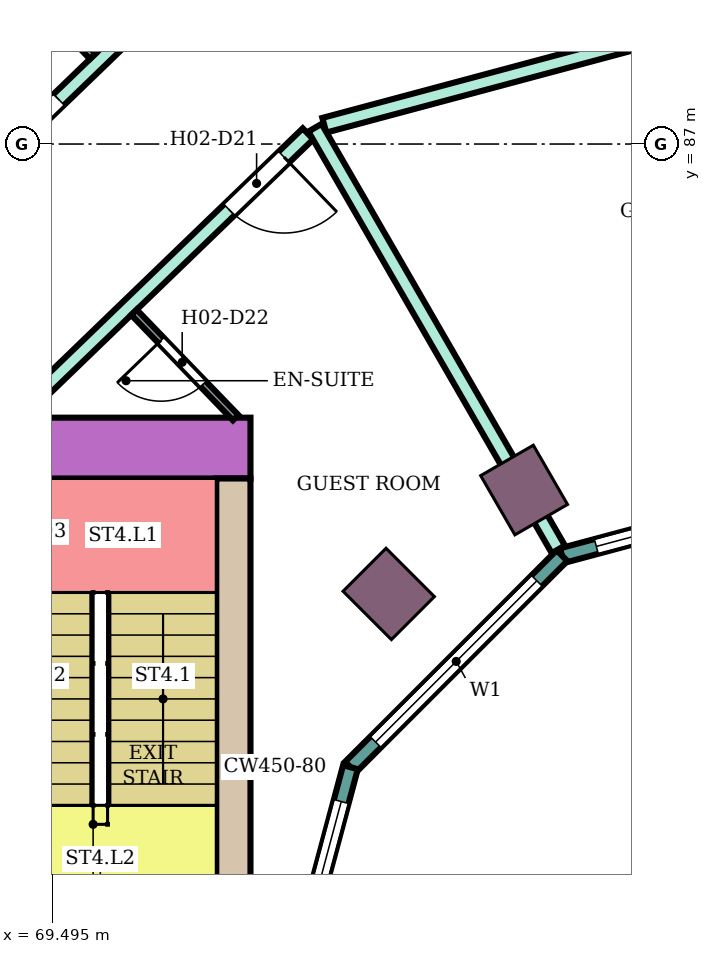
"""IFC4 building model, lengths in metres.
Left out: names, types, materials, properties, quantities, classifications, styles, units other than length and angle.
Written with IfcOpenShell. Run it as: python <this file> out.ifc"""

import sys

from ifc_helpers import new_model, si_unit, direction, frame, frame_2d, origin, origin_2d, place, context, subcontext, project, spatial, rectangle, extrude, element, fill, save


model = new_model("IFC4")
c1 = context("Model", 3, precision=1e-05, world=origin(), true_north=direction((0.0, 1.0)))
c2 = subcontext(c1, "Body", "Model", "MODEL_VIEW")
j1 = project(units=[si_unit("LENGTHUNIT", "METRE"), si_unit("PLANEANGLEUNIT", "RADIAN")], contexts=[c1])
p1 = place(None, origin())
s1 = spatial("IfcSite", under=j1, at=p1, CompositionType="ELEMENT")
p2 = place(p1, origin())
s2 = spatial("IfcBuilding", under=s1, at=p2, CompositionType="ELEMENT")
p3 = place(p2, frame((0.0, 0.0, 47.8)))
s3 = spatial("IfcBuildingStorey", under=s2, at=p3, CompositionType="ELEMENT", Elevation=47.8)
for number, where, z_axis, x_axis in (
    (1, (75.7, 82.448, 0.0), (0.0, 0.0, 1.0), (-0.5, 0.866, 0.0)),
    (2, (73.919, 81.081, 0.0), (0.0, 0.0, 1.0), (-0.707, 0.707, 0.0)),
):
    element("IfcColumn", number, at=place(p3, frame(where, z_axis=z_axis, x_axis=x_axis)), inside=s3, PredefinedType="COLUMN", context=c2, shape_type="SweptSolid", body=[
        extrude(rectangle(XDim=0.9, YDim=0.8, at=origin_2d()), origin(), (0.0, 0.0, 1.0), 3.8),
    ])
p4 = place(p3, frame((72.1, 83.0, 0.0), z_axis=(0.0, 0.0, 1.0), x_axis=(-1.0, 0.0, 0.0)))
e3 = element("IfcWall", 3, at=p4, inside=s3, PredefinedType="SHEAR", context=c2, shape_type="SweptSolid", body=[
    extrude(rectangle(XDim=14.7, YDim=0.8, at=frame_2d((7.35, 0.0))), origin(), (0.0, 0.0, 1.0), 3.48),
])
p5 = place(p4, frame((4.2, 0.0, 0.0)))
e4 = element("IfcOpeningElement", 4, at=p5, cuts=e3, PredefinedType="OPENING", context=c2, shape_type="SweptSolid", body=[
    extrude(rectangle(XDim=2.4, YDim=2.4, at=frame_2d((1.2, 1.2))), frame((0.0, 0.41, 0.0), z_axis=(0.0, -1.0, 0.0), x_axis=(1.0, 0.0, 0.0)), (0.0, 0.0, 1.0), 0.82),
])
p6 = place(p3, frame((71.875, 82.6, 0.0), z_axis=(0.0, 0.0, 1.0), x_axis=(0.0, -1.0, 0.0)))
e5 = element("IfcWall", 5, at=p6, inside=s3, PredefinedType="SHEAR", context=c2, shape_type="SweptSolid", body=[
    extrude(rectangle(XDim=7.6, YDim=0.45, at=frame_2d((3.8, 0.0))), origin(), (0.0, 0.0, 1.0), 3.48),
])
p7 = place(p3, frame((80.0, 82.604, 0.0), z_axis=(0.0, 0.0, 1.0), x_axis=(-0.965933654434, -0.258789828301, 0.0)))
e6 = element("IfcWall", 6, at=p7, inside=s3, PredefinedType="NOTDEFINED", context=c2, shape_type="SweptSolid", body=[
    extrude(rectangle(XDim=3.936, YDim=0.2, at=frame_2d((1.968, 0.0))), origin(), (0.0, 0.0, 1.0), 3.8),
])
p8 = place(p7, frame((0.468, 0.0, 0.9)))
e7 = element("IfcOpeningElement", 7, at=p8, cuts=e6, PredefinedType="OPENING", context=c2, shape_type="SweptSolid", body=[
    extrude(rectangle(XDim=3.0, YDim=2.3, at=frame_2d((1.5, 1.15))), frame((0.0, 0.11, 0.0), z_axis=(0.0, -1.0, 0.0), x_axis=(1.0, 0.0, 0.0)), (0.0, 0.0, 1.0), 0.22),
])
p9 = place(p3, frame((76.198, 81.585, 0.0), z_axis=(0.0, 0.0, 1.0), x_axis=(-0.707106781187, -0.707106781187, 0.0)))
e8 = element("IfcWall", 8, at=p9, inside=s3, PredefinedType="NOTDEFINED", context=c2, shape_type="SweptSolid", body=[
    extrude(rectangle(XDim=3.936, YDim=0.2, at=frame_2d((1.968, 0.0))), origin(), (0.0, 0.0, 1.0), 3.8),
])
p10 = place(p9, frame((0.468, 0.0, 0.9)))
e9 = element("IfcOpeningElement", 9, at=p10, cuts=e8, PredefinedType="OPENING", context=c2, shape_type="SweptSolid", body=[
    extrude(rectangle(XDim=3.0, YDim=2.3, at=frame_2d((1.5, 1.15))), frame((0.0, 0.11, 0.0), z_axis=(0.0, -1.0, 0.0), x_axis=(1.0, 0.0, 0.0)), (0.0, 0.0, 1.0), 0.22),
])
p11 = place(p3, frame((73.415, 78.802, 0.0), z_axis=(0.0, 0.0, 1.0), x_axis=(-0.258789828301, -0.965933654434, 0.0)))
e10 = element("IfcWall", 10, at=p11, inside=s3, PredefinedType="NOTDEFINED", context=c2, shape_type="SweptSolid", body=[
    extrude(rectangle(XDim=3.936, YDim=0.2, at=frame_2d((1.968, 0.0))), origin(), (0.0, 0.0, 1.0), 3.8),
])
p12 = place(p11, frame((0.468, 0.0, 0.9)))
e11 = element("IfcOpeningElement", 11, at=p12, cuts=e10, PredefinedType="OPENING", context=c2, shape_type="SweptSolid", body=[
    extrude(rectangle(XDim=3.0, YDim=2.3, at=frame_2d((1.5, 1.15))), frame((0.0, 0.11, 0.0), z_axis=(0.0, -1.0, 0.0), x_axis=(1.0, 0.0, 0.0)), (0.0, 0.0, 1.0), 0.22),
])
p13 = place(p3, frame((66.796, 84.9, 0.0), z_axis=(0.0, 0.0, 1.0), x_axis=(0.719690131178, 0.694295409092, 0.0)))
e12 = element("IfcWall", 12, at=p13, inside=s3, PredefinedType="PARTITIONING", context=c2, shape_type="SweptSolid", body=[
    extrude(rectangle(XDim=6.585, YDim=0.2, at=frame_2d((3.293, 0.0))), origin(), (0.0, 0.0, 1.0), 3.35),
])
p14 = place(p13, frame((2.867, 0.0, 0.0)))
e13 = element("IfcOpeningElement", 13, at=p14, cuts=e12, PredefinedType="OPENING", context=c2, shape_type="SweptSolid", body=[
    extrude(rectangle(XDim=1.0, YDim=2.1, at=frame_2d((0.5, 1.05))), frame((0.0, 0.11, 0.0), z_axis=(0.0, -1.0, 0.0), x_axis=(1.0, 0.0, 0.0)), (0.0, 0.0, 1.0), 0.22),
])
p15 = place(p3, frame((68.987, 83.4, 0.0), z_axis=(0.0, 0.0, 1.0), x_axis=(0.719591503389, 0.694397629784, 0.0)))
e14 = element("IfcWall", 14, at=p15, inside=s3, PredefinedType="PARTITIONING", context=c2, shape_type="SweptSolid", body=[
    extrude(rectangle(XDim=5.378, YDim=0.2, at=frame_2d((2.689, 0.0))), origin(), (0.0, 0.0, 1.0), 3.35),
])
p16 = place(p15, frame((3.938, 0.0, 0.0)))
e15 = element("IfcOpeningElement", 15, at=p16, cuts=e14, PredefinedType="OPENING", context=c2, shape_type="SweptSolid", body=[
    extrude(rectangle(XDim=1.0, YDim=2.1, at=frame_2d((0.5, 1.05))), frame((0.0, 0.11, 0.0), z_axis=(0.0, -1.0, 0.0), x_axis=(1.0, 0.0, 0.0)), (0.0, 0.0, 1.0), 0.22),
])
p17 = place(p3, frame((73.071, 87.247, 0.0), z_axis=(0.0, 0.0, 1.0), x_axis=(0.965920206274, 0.258840018373, 0.0)))
e16 = element("IfcWall", 16, at=p17, inside=s3, PredefinedType="PARTITIONING", context=c2, shape_type="SweptSolid", body=[
    extrude(rectangle(XDim=7.123, YDim=0.2, at=frame_2d((3.562, 0.0))), origin(), (0.0, 0.0, 1.0), 3.35),
])
p18 = place(p3, frame((72.949, 87.215, 0.0), z_axis=(0.0, 0.0, 1.0), x_axis=(0.499890755261, -0.866088467077, 0.0)))
e17 = element("IfcWall", 17, at=p18, inside=s3, PredefinedType="PARTITIONING", context=c2, shape_type="SweptSolid", body=[
    extrude(rectangle(XDim=6.404, YDim=0.2, at=frame_2d((3.202, 0.0))), origin(), (0.0, 0.0, 1.0), 3.35),
])
p19 = place(p3, frame((68.185, 90.06, 0.0), z_axis=(0.0, 0.0, 1.0), x_axis=(0.69446127412, -0.719530081892, 0.0)))
e18 = element("IfcWall", 18, at=p19, inside=s3, PredefinedType="PARTITIONING", context=c2, shape_type="SweptSolid", body=[
    extrude(rectangle(XDim=2.649, YDim=0.1, at=frame_2d((1.324, 0.0))), origin(), (0.0, 0.0, 1.0), 3.35),
])
p20 = place(p19, frame((0.95, 0.0, 0.0)))
e19 = element("IfcOpeningElement", 19, at=p20, cuts=e18, PredefinedType="OPENING", context=c2, shape_type="SweptSolid", body=[
    extrude(rectangle(XDim=0.8, YDim=2.1, at=frame_2d((0.4, 1.05))), frame((0.0, 0.06, 0.0), z_axis=(0.0, -1.0, 0.0), x_axis=(1.0, 0.0, 0.0)), (0.0, 0.0, 1.0), 0.12),
])
p21 = place(p3, frame((70.567, 84.786, 0.0), z_axis=(0.0, 0.0, 1.0), x_axis=(0.694447472534, -0.719543402368, 0.0)))
e20 = element("IfcWall", 20, at=p21, inside=s3, PredefinedType="PARTITIONING", context=c2, shape_type="SweptSolid", body=[
    extrude(rectangle(XDim=1.926, YDim=0.1, at=frame_2d((0.963, 0.0))), origin(), (0.0, 0.0, 1.0), 3.35),
])
p22 = place(p21, frame((0.513, 0.0, 0.0)))
e21 = element("IfcOpeningElement", 21, at=p22, cuts=e20, PredefinedType="OPENING", context=c2, shape_type="SweptSolid", body=[
    extrude(rectangle(XDim=0.8, YDim=2.1, at=frame_2d((0.4, 1.05))), frame((0.0, 0.06, 0.0), z_axis=(0.0, -1.0, 0.0), x_axis=(1.0, 0.0, 0.0)), (0.0, 0.0, 1.0), 0.12),
])
p23 = place(p8, origin())
e22 = element("IfcWindow", 22, at=p23, inside=s3, PartitioningType="SINGLE_PANEL", PredefinedType="WINDOW", context=c2, shape_type="SweptSolid", body=[
    extrude(rectangle(XDim=3.0, YDim=2.3, at=frame_2d((1.5, 1.15))), frame((0.0, 0.03, 0.0), z_axis=(0.0, -1.0, 0.0), x_axis=(1.0, 0.0, 0.0)), (0.0, 0.0, 1.0), 0.06),
])
fill(e7, e22)
p24 = place(p10, origin())
e23 = element("IfcWindow", 23, at=p24, inside=s3, PartitioningType="SINGLE_PANEL", PredefinedType="WINDOW", context=c2, shape_type="SweptSolid", body=[
    extrude(rectangle(XDim=3.0, YDim=2.3, at=frame_2d((1.5, 1.15))), frame((0.0, 0.03, 0.0), z_axis=(0.0, -1.0, 0.0), x_axis=(1.0, 0.0, 0.0)), (0.0, 0.0, 1.0), 0.06),
])
fill(e9, e23)
p25 = place(p12, origin())
e24 = element("IfcWindow", 24, at=p25, inside=s3, PartitioningType="SINGLE_PANEL", PredefinedType="WINDOW", context=c2, shape_type="SweptSolid", body=[
    extrude(rectangle(XDim=3.0, YDim=2.3, at=frame_2d((1.5, 1.15))), frame((0.0, 0.03, 0.0), z_axis=(0.0, -1.0, 0.0), x_axis=(1.0, 0.0, 0.0)), (0.0, 0.0, 1.0), 0.06),
])
fill(e11, e24)
p26 = place(p14, origin())
e25 = element("IfcDoor", 25, at=p26, inside=s3, OperationType="SINGLE_SWING_LEFT", PredefinedType="DOOR", context=c2, shape_type="SweptSolid", body=[
    extrude(rectangle(XDim=1.0, YDim=2.1, at=frame_2d((0.5, 1.05))), frame((0.0, 0.025, 0.0), z_axis=(0.0, -1.0, 0.0), x_axis=(1.0, 0.0, 0.0)), (0.0, 0.0, 1.0), 0.05),
])
fill(e13, e25)
p27 = place(p16, frame((1.0, 0.0, 0.0), z_axis=(0.0, 0.0, 1.0), x_axis=(-1.0, 0.0, 0.0)))
e26 = element("IfcDoor", 26, at=p27, inside=s3, OperationType="SINGLE_SWING_LEFT", PredefinedType="DOOR", context=c2, shape_type="SweptSolid", body=[
    extrude(rectangle(XDim=1.0, YDim=2.1, at=frame_2d((0.5, 1.05))), frame((0.0, 0.025, 0.0), z_axis=(0.0, -1.0, 0.0), x_axis=(1.0, 0.0, 0.0)), (0.0, 0.0, 1.0), 0.05),
])
fill(e15, e26)
p28 = place(p22, frame((0.8, 0.0, 0.0), z_axis=(0.0, 0.0, 1.0), x_axis=(-1.0, 0.0, 0.0)))
e27 = element("IfcDoor", 27, at=p28, inside=s3, OperationType="SINGLE_SWING_RIGHT", PredefinedType="DOOR", context=c2, shape_type="SweptSolid", body=[
    extrude(rectangle(XDim=0.8, YDim=2.1, at=frame_2d((0.4, 1.05))), frame((0.0, 0.025, 0.0), z_axis=(0.0, -1.0, 0.0), x_axis=(1.0, 0.0, 0.0)), (0.0, 0.0, 1.0), 0.05),
])
fill(e21, e27)
save(model, sys.argv[1])
